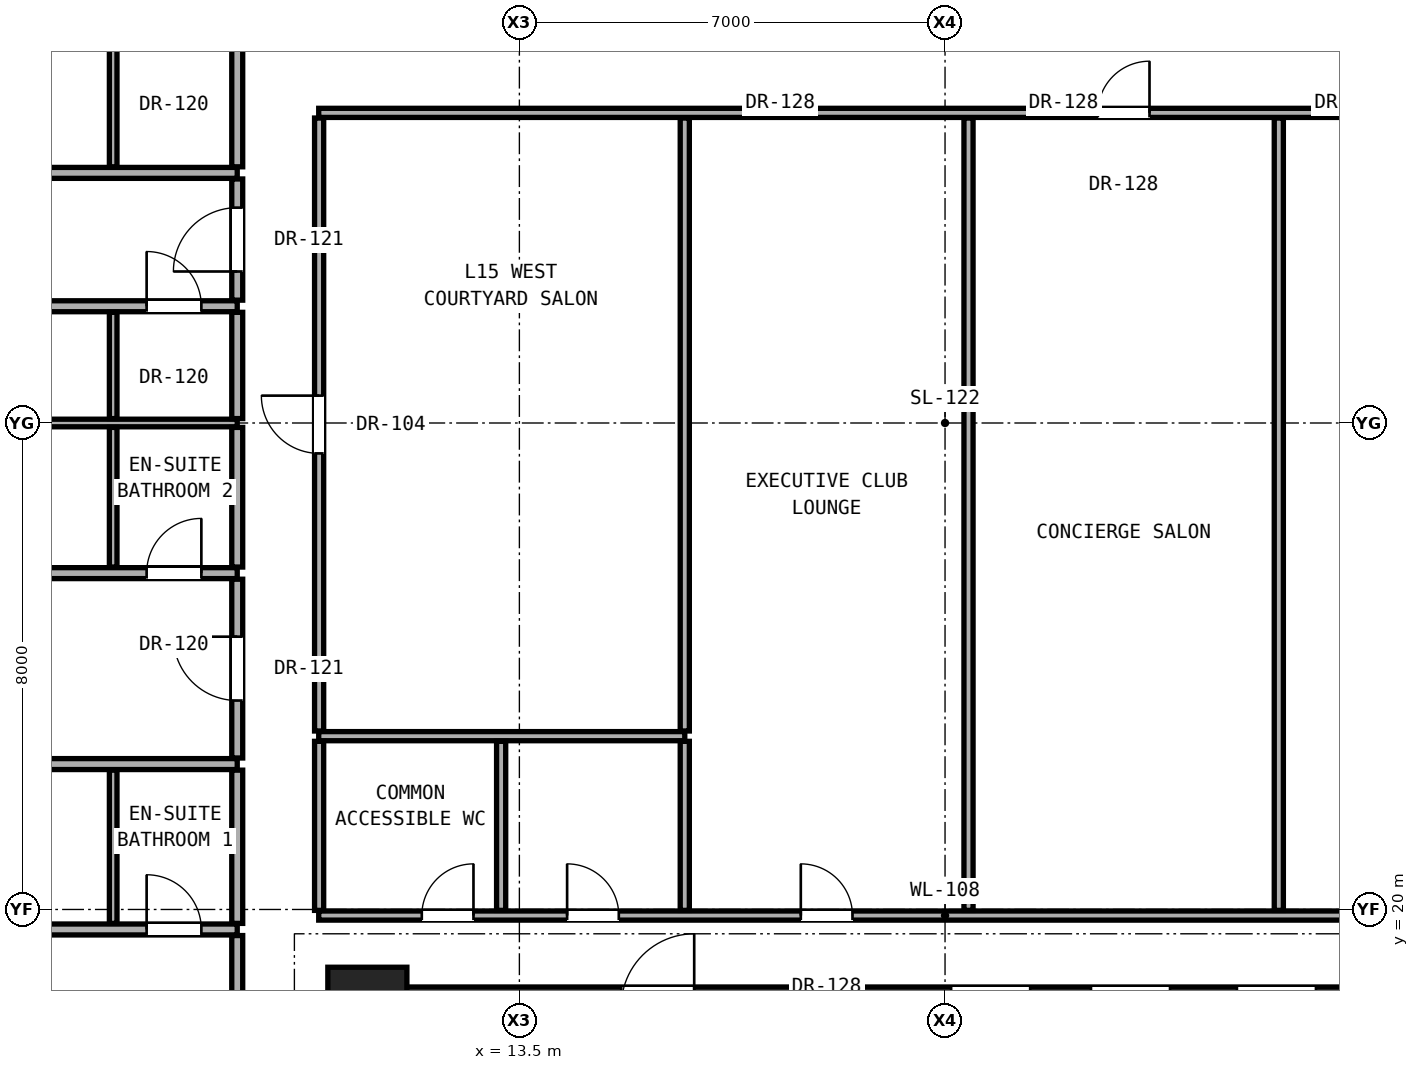
"""IFC4 building model, lengths in metres.
Left out: names, types, materials, properties, quantities, classifications, styles, units other than length and angle.
Written with IfcOpenShell. Run it as: python <this file> out.ifc"""

import sys

from ifc_helpers import new_model, si_unit, direction, frame, frame_2d, origin, origin_2d, place, context, subcontext, project, spatial, rectangle, extrude, element, fill, save


model = new_model("IFC4")
c1 = context("Model", 3, precision=1e-05, world=origin(), true_north=direction((0.0, 1.0)))
c2 = subcontext(c1, "Body", "Model", "MODEL_VIEW")
j1 = project(units=[si_unit("LENGTHUNIT", "METRE"), si_unit("PLANEANGLEUNIT", "RADIAN")], contexts=[c1])
p1 = place(None, origin())
s1 = spatial("IfcSite", under=j1, at=p1, CompositionType="ELEMENT")
p2 = place(p1, origin())
s2 = spatial("IfcBuilding", under=s1, at=p2, CompositionType="ELEMENT")
p3 = place(p2, frame((0.0, 0.0, 55.4)))
s3 = spatial("IfcBuildingStorey", under=s2, at=p3, CompositionType="ELEMENT", Elevation=55.4)
p4 = place(p3, frame((11.0, 18.4, 0.0), z_axis=(0.0, 0.0, 1.0), x_axis=(1.0, 0.0, 0.0)))
e1 = element("IfcColumn", 1, at=p4, inside=s3, PredefinedType="COLUMN", context=c2, shape_type="SweptSolid", body=[
    extrude(rectangle(XDim=1.3, YDim=1.3, at=origin_2d()), origin(), (0.0, 0.0, 1.0), 3.3),
])
p5 = place(p3, frame((11.0, 18.4, 0.0), z_axis=(0.0, 0.0, 1.0), x_axis=(1.0, 0.0, 0.0)))
e2 = element("IfcWall", 2, at=p5, inside=s3, PredefinedType="SHEAR", context=c2, shape_type="SweptSolid", body=[
    extrude(rectangle(XDim=19.0, YDim=0.65, at=frame_2d((9.5, 0.0))), origin(), (0.0, 0.0, 1.0), 3.06),
])
p6 = place(p5, frame((4.175, 0.0, 0.0)))
e3 = element("IfcOpeningElement", 3, at=p6, cuts=e2, PredefinedType="OPENING", context=c2, shape_type="SweptSolid", body=[
    extrude(rectangle(XDim=1.2, YDim=2.25, at=frame_2d((0.6, 1.125))), frame((0.0, 0.335, 0.0), z_axis=(0.0, -1.0, 0.0), x_axis=(1.0, 0.0, 0.0)), (0.0, 0.0, 1.0), 0.67),
])
p7 = place(p5, frame((9.6, 0.0, 0.0)))
e4 = element("IfcOpeningElement", 4, at=p7, cuts=e2, PredefinedType="OPENING", context=c2, shape_type="SweptSolid", body=[
    extrude(rectangle(XDim=1.3, YDim=2.3, at=frame_2d((0.65, 1.15))), frame((0.0, 0.335, 0.0), z_axis=(0.0, -1.0, 0.0), x_axis=(1.0, 0.0, 0.0)), (0.0, 0.0, 1.0), 0.67),
])
p8 = place(p5, frame((11.9, 0.0, 0.0)))
e5 = element("IfcOpeningElement", 5, at=p8, cuts=e2, PredefinedType="OPENING", context=c2, shape_type="SweptSolid", body=[
    extrude(rectangle(XDim=1.3, YDim=2.3, at=frame_2d((0.65, 1.15))), frame((0.0, 0.335, 0.0), z_axis=(0.0, -1.0, 0.0), x_axis=(1.0, 0.0, 0.0)), (0.0, 0.0, 1.0), 0.67),
])
p9 = place(p5, frame((14.3, 0.0, 0.0)))
e6 = element("IfcOpeningElement", 6, at=p9, cuts=e2, PredefinedType="OPENING", context=c2, shape_type="SweptSolid", body=[
    extrude(rectangle(XDim=1.3, YDim=2.3, at=frame_2d((0.65, 1.15))), frame((0.0, 0.335, 0.0), z_axis=(0.0, -1.0, 0.0), x_axis=(1.0, 0.0, 0.0)), (0.0, 0.0, 1.0), 0.67),
])
p10 = place(p5, frame((16.6, 0.0, 0.0)))
e7 = element("IfcOpeningElement", 7, at=p10, cuts=e2, PredefinedType="OPENING", context=c2, shape_type="SweptSolid", body=[
    extrude(rectangle(XDim=1.3, YDim=2.3, at=frame_2d((0.65, 1.15))), frame((0.0, 0.335, 0.0), z_axis=(0.0, -1.0, 0.0), x_axis=(1.0, 0.0, 0.0)), (0.0, 0.0, 1.0), 0.67),
])
p11 = place(p3, frame((-0.36, 19.671, 0.0), z_axis=(0.0, 0.0, 1.0), x_axis=(1.0, 0.0, 0.0)))
e8 = element("IfcWall", 8, at=p11, inside=s3, PredefinedType="PARTITIONING", context=c2, shape_type="SweptSolid", body=[
    extrude(rectangle(XDim=9.22, YDim=0.18, at=frame_2d((4.61, 0.0))), origin(), (0.0, 0.0, 1.0), 2.125),
])
p12 = place(p11, frame((3.485, 0.0, 0.0)))
e9 = element("IfcOpeningElement", 9, at=p12, cuts=e8, PredefinedType="OPENING", context=c2, shape_type="SweptSolid", body=[
    extrude(rectangle(XDim=0.85, YDim=2.01, at=frame_2d((0.425, 1.005))), frame((0.0, 0.1, 0.0), z_axis=(0.0, -1.0, 0.0), x_axis=(1.0, 0.0, 0.0)), (0.0, 0.0, 1.0), 0.2),
])
p13 = place(p11, frame((7.73, 0.0, 0.0)))
e10 = element("IfcOpeningElement", 10, at=p13, cuts=e8, PredefinedType="OPENING", context=c2, shape_type="SweptSolid", body=[
    extrude(rectangle(XDim=0.9, YDim=2.1, at=frame_2d((0.45, 1.05))), frame((0.0, 0.1, 0.0), z_axis=(0.0, -1.0, 0.0), x_axis=(1.0, 0.0, 0.0)), (0.0, 0.0, 1.0), 0.2),
])
p14 = place(p3, frame((10.2, 19.9, 0.0), z_axis=(0.0, 0.0, 1.0), x_axis=(1.0, 0.0, 0.0)))
e11 = element("IfcWall", 11, at=p14, inside=s3, PredefinedType="PARTITIONING", context=c2, shape_type="SweptSolid", body=[
    extrude(rectangle(XDim=20.6, YDim=0.15, at=frame_2d((10.3, 0.0))), origin(), (0.0, 0.0, 1.0), 2.104),
])
p15 = place(p14, frame((1.695, 0.0, 0.0)))
e12 = element("IfcOpeningElement", 12, at=p15, cuts=e11, PredefinedType="OPENING", context=c2, shape_type="SweptSolid", body=[
    extrude(rectangle(XDim=0.85, YDim=2.01, at=frame_2d((0.425, 1.005))), frame((0.0, 0.085, 0.0), z_axis=(0.0, -1.0, 0.0), x_axis=(1.0, 0.0, 0.0)), (0.0, 0.0, 1.0), 0.17),
])
p16 = place(p14, frame((4.085, 0.0, 0.0)))
e13 = element("IfcOpeningElement", 13, at=p16, cuts=e11, PredefinedType="OPENING", context=c2, shape_type="SweptSolid", body=[
    extrude(rectangle(XDim=0.85, YDim=2.01, at=frame_2d((0.425, 1.005))), frame((0.0, 0.085, 0.0), z_axis=(0.0, -1.0, 0.0), x_axis=(1.0, 0.0, 0.0)), (0.0, 0.0, 1.0), 0.17),
])
p17 = place(p14, frame((7.928, 0.0, 0.0)))
e14 = element("IfcOpeningElement", 14, at=p17, cuts=e11, PredefinedType="OPENING", context=c2, shape_type="SweptSolid", body=[
    extrude(rectangle(XDim=0.85, YDim=2.01, at=frame_2d((0.425, 1.005))), frame((0.0, 0.085, 0.0), z_axis=(0.0, -1.0, 0.0), x_axis=(1.0, 0.0, 0.0)), (0.0, 0.0, 1.0), 0.17),
])
p18 = place(p3, frame((-0.36, 22.391, 0.0), z_axis=(0.0, 0.0, 1.0), x_axis=(1.0, 0.0, 0.0)))
e15 = element("IfcWall", 15, at=p18, inside=s3, PredefinedType="PARTITIONING", context=c2, shape_type="SweptSolid", body=[
    extrude(rectangle(XDim=9.22, YDim=0.18, at=frame_2d((4.61, 0.0))), origin(), (0.0, 0.0, 1.0), 2.125),
])
p19 = place(p3, frame((10.2, 22.85, 0.0), z_axis=(0.0, 0.0, 1.0), x_axis=(1.0, 0.0, 0.0)))
e16 = element("IfcWall", 16, at=p19, inside=s3, PredefinedType="PARTITIONING", context=c2, shape_type="SweptSolid", body=[
    extrude(rectangle(XDim=6.02, YDim=0.15, at=frame_2d((3.01, 0.0))), origin(), (0.0, 0.0, 1.0), 2.104),
])
p20 = place(p3, frame((-0.36, 25.531, 0.0), z_axis=(0.0, 0.0, 1.0), x_axis=(1.0, 0.0, 0.0)))
e17 = element("IfcWall", 17, at=p20, inside=s3, PredefinedType="PARTITIONING", context=c2, shape_type="SweptSolid", body=[
    extrude(rectangle(XDim=9.22, YDim=0.18, at=frame_2d((4.61, 0.0))), origin(), (0.0, 0.0, 1.0), 2.125),
])
p21 = place(p20, frame((3.485, 0.0, 0.0)))
e18 = element("IfcOpeningElement", 18, at=p21, cuts=e17, PredefinedType="OPENING", context=c2, shape_type="SweptSolid", body=[
    extrude(rectangle(XDim=0.85, YDim=2.01, at=frame_2d((0.425, 1.005))), frame((0.0, 0.1, 0.0), z_axis=(0.0, -1.0, 0.0), x_axis=(1.0, 0.0, 0.0)), (0.0, 0.0, 1.0), 0.2),
])
p22 = place(p20, frame((7.73, 0.0, 0.0)))
e19 = element("IfcOpeningElement", 19, at=p22, cuts=e17, PredefinedType="OPENING", context=c2, shape_type="SweptSolid", body=[
    extrude(rectangle(XDim=0.9, YDim=2.1, at=frame_2d((0.45, 1.05))), frame((0.0, 0.1, 0.0), z_axis=(0.0, -1.0, 0.0), x_axis=(1.0, 0.0, 0.0)), (0.0, 0.0, 1.0), 0.2),
])
p23 = place(p3, frame((-0.36, 28.0, 0.0), z_axis=(0.0, 0.0, 1.0), x_axis=(1.0, 0.0, 0.0)))
e20 = element("IfcWall", 20, at=p23, inside=s3, PredefinedType="PARTITIONING", context=c2, shape_type="SweptSolid", body=[
    extrude(rectangle(XDim=9.22, YDim=0.125, at=frame_2d((4.61, 0.0))), origin(), (0.0, 0.0, 1.0), 2.125),
])
p24 = place(p3, frame((-0.36, 29.92, 0.0), z_axis=(0.0, 0.0, 1.0), x_axis=(1.0, 0.0, 0.0)))
e21 = element("IfcWall", 21, at=p24, inside=s3, PredefinedType="PARTITIONING", context=c2, shape_type="SweptSolid", body=[
    extrude(rectangle(XDim=9.22, YDim=0.18, at=frame_2d((4.61, 0.0))), origin(), (0.0, 0.0, 1.0), 2.125),
])
p25 = place(p24, frame((3.485, 0.0, 0.0)))
e22 = element("IfcOpeningElement", 22, at=p25, cuts=e21, PredefinedType="OPENING", context=c2, shape_type="SweptSolid", body=[
    extrude(rectangle(XDim=0.85, YDim=2.01, at=frame_2d((0.425, 1.005))), frame((0.0, 0.1, 0.0), z_axis=(0.0, -1.0, 0.0), x_axis=(1.0, 0.0, 0.0)), (0.0, 0.0, 1.0), 0.2),
])
p26 = place(p24, frame((7.73, 0.0, 0.0)))
e23 = element("IfcOpeningElement", 23, at=p26, cuts=e21, PredefinedType="OPENING", context=c2, shape_type="SweptSolid", body=[
    extrude(rectangle(XDim=0.9, YDim=2.1, at=frame_2d((0.45, 1.05))), frame((0.0, 0.1, 0.0), z_axis=(0.0, -1.0, 0.0), x_axis=(1.0, 0.0, 0.0)), (0.0, 0.0, 1.0), 0.2),
])
p27 = place(p3, frame((-0.36, 32.113, 0.0), z_axis=(0.0, 0.0, 1.0), x_axis=(1.0, 0.0, 0.0)))
e24 = element("IfcWall", 24, at=p27, inside=s3, PredefinedType="PARTITIONING", context=c2, shape_type="SweptSolid", body=[
    extrude(rectangle(XDim=9.22, YDim=0.18, at=frame_2d((4.61, 0.0))), origin(), (0.0, 0.0, 1.0), 2.125),
])
p28 = place(p3, frame((10.2, 33.1, 0.0), z_axis=(0.0, 0.0, 1.0), x_axis=(1.0, 0.0, 0.0)))
e25 = element("IfcWall", 25, at=p28, inside=s3, PredefinedType="PARTITIONING", context=c2, shape_type="SweptSolid", body=[
    extrude(rectangle(XDim=20.6, YDim=0.15, at=frame_2d((10.3, 0.0))), origin(), (0.0, 0.0, 1.0), 2.104),
])
p29 = place(p28, frame((12.812, 0.0, 0.0)))
e26 = element("IfcOpeningElement", 26, at=p29, cuts=e25, PredefinedType="OPENING", context=c2, shape_type="SweptSolid", body=[
    extrude(rectangle(XDim=0.85, YDim=2.01, at=frame_2d((0.425, 1.005))), frame((0.0, 0.085, 0.0), z_axis=(0.0, -1.0, 0.0), x_axis=(1.0, 0.0, 0.0)), (0.0, 0.0, 1.0), 0.17),
])
p30 = place(p28, frame((17.75, 0.0, 0.0)))
e27 = element("IfcOpeningElement", 27, at=p30, cuts=e25, PredefinedType="OPENING", context=c2, shape_type="SweptSolid", body=[
    extrude(rectangle(XDim=0.85, YDim=2.01, at=frame_2d((0.425, 1.005))), frame((0.0, 0.085, 0.0), z_axis=(0.0, -1.0, 0.0), x_axis=(1.0, 0.0, 0.0)), (0.0, 0.0, 1.0), 0.17),
])
p31 = place(p3, frame((6.82, 19.771, 0.0), z_axis=(0.0, 0.0, 1.0), x_axis=(0.0, 1.0, 0.0)))
e28 = element("IfcWall", 28, at=p31, inside=s3, PredefinedType="PARTITIONING", context=c2, shape_type="SweptSolid", body=[
    extrude(rectangle(XDim=2.52, YDim=0.125, at=frame_2d((1.26, 0.0))), origin(), (0.0, 0.0, 1.0), 3.06),
])
p32 = place(p3, frame((6.82, 25.631, 0.0), z_axis=(0.0, 0.0, 1.0), x_axis=(0.0, 1.0, 0.0)))
e29 = element("IfcWall", 29, at=p32, inside=s3, PredefinedType="PARTITIONING", context=c2, shape_type="SweptSolid", body=[
    extrude(rectangle(XDim=2.296, YDim=0.125, at=frame_2d((1.148, 0.0))), origin(), (0.0, 0.0, 1.0), 3.06),
])
p33 = place(p3, frame((6.82, 28.073, 0.0), z_axis=(0.0, 0.0, 1.0), x_axis=(0.0, 1.0, 0.0)))
e30 = element("IfcWall", 30, at=p33, inside=s3, PredefinedType="PARTITIONING", context=c2, shape_type="SweptSolid", body=[
    extrude(rectangle(XDim=1.748, YDim=0.125, at=frame_2d((0.874, 0.0))), origin(), (0.0, 0.0, 1.0), 3.06),
])
p34 = place(p3, frame((6.82, 32.213, 0.0), z_axis=(0.0, 0.0, 1.0), x_axis=(0.0, 1.0, 0.0)))
e31 = element("IfcWall", 31, at=p34, inside=s3, PredefinedType="PARTITIONING", context=c2, shape_type="SweptSolid", body=[
    extrude(rectangle(XDim=2.1, YDim=0.125, at=frame_2d((1.05, 0.0))), origin(), (0.0, 0.0, 1.0), 3.06),
])
p35 = place(p3, frame((8.86, 14.602, 0.0), z_axis=(0.0, 0.0, 1.0), x_axis=(0.0, 1.0, 0.0)))
e32 = element("IfcWall", 32, at=p35, inside=s3, PredefinedType="PARTITIONING", context=c2, shape_type="SweptSolid", body=[
    extrude(rectangle(XDim=4.969, YDim=0.18, at=frame_2d((2.484, 0.0))), origin(), (0.0, 0.0, 1.0), 2.436),
])
p36 = place(p35, frame((2.26, 0.0, 0.0)))
e33 = element("IfcOpeningElement", 33, at=p36, cuts=e32, PredefinedType="OPENING", context=c2, shape_type="SweptSolid", body=[
    extrude(rectangle(XDim=1.05, YDim=2.2, at=frame_2d((0.525, 1.1))), frame((0.0, 0.1, 0.0), z_axis=(0.0, -1.0, 0.0), x_axis=(1.0, 0.0, 0.0)), (0.0, 0.0, 1.0), 0.2),
])
p37 = place(p3, frame((8.86, 19.771, 0.0), z_axis=(0.0, 0.0, 1.0), x_axis=(0.0, 1.0, 0.0)))
e34 = element("IfcWall", 34, at=p37, inside=s3, PredefinedType="PARTITIONING", context=c2, shape_type="SweptSolid", body=[
    extrude(rectangle(XDim=2.52, YDim=0.18, at=frame_2d((1.26, 0.0))), origin(), (0.0, 0.0, 1.0), 3.06),
])
p38 = place(p3, frame((8.86, 22.491, 0.0), z_axis=(0.0, 0.0, 1.0), x_axis=(0.0, 1.0, 0.0)))
e35 = element("IfcWall", 35, at=p38, inside=s3, PredefinedType="PARTITIONING", context=c2, shape_type="SweptSolid", body=[
    extrude(rectangle(XDim=2.94, YDim=0.18, at=frame_2d((1.47, 0.0))), origin(), (0.0, 0.0, 1.0), 2.279),
])
p39 = place(p38, frame((0.945, 0.0, 0.0)))
e36 = element("IfcOpeningElement", 36, at=p39, cuts=e35, PredefinedType="OPENING", context=c2, shape_type="SweptSolid", body=[
    extrude(rectangle(XDim=1.05, YDim=2.2, at=frame_2d((0.525, 1.1))), frame((0.0, 0.1, 0.0), z_axis=(0.0, -1.0, 0.0), x_axis=(1.0, 0.0, 0.0)), (0.0, 0.0, 1.0), 0.2),
])
p40 = place(p3, frame((8.86, 25.631, 0.0), z_axis=(0.0, 0.0, 1.0), x_axis=(0.0, 1.0, 0.0)))
e37 = element("IfcWall", 37, at=p40, inside=s3, PredefinedType="PARTITIONING", context=c2, shape_type="SweptSolid", body=[
    extrude(rectangle(XDim=2.296, YDim=0.18, at=frame_2d((1.148, 0.0))), origin(), (0.0, 0.0, 1.0), 3.06),
])
p41 = place(p3, frame((8.86, 28.073, 0.0), z_axis=(0.0, 0.0, 1.0), x_axis=(0.0, 1.0, 0.0)))
e38 = element("IfcWall", 38, at=p41, inside=s3, PredefinedType="PARTITIONING", context=c2, shape_type="SweptSolid", body=[
    extrude(rectangle(XDim=1.748, YDim=0.18, at=frame_2d((0.874, 0.0))), origin(), (0.0, 0.0, 1.0), 3.06),
])
p42 = place(p3, frame((8.86, 30.02, 0.0), z_axis=(0.0, 0.0, 1.0), x_axis=(0.0, 1.0, 0.0)))
e39 = element("IfcWall", 39, at=p42, inside=s3, PredefinedType="PARTITIONING", context=c2, shape_type="SweptSolid", body=[
    extrude(rectangle(XDim=1.993, YDim=0.18, at=frame_2d((0.997, 0.0))), origin(), (0.0, 0.0, 1.0), 2.279),
])
p43 = place(p42, frame((0.471, 0.0, 0.0)))
e40 = element("IfcOpeningElement", 40, at=p43, cuts=e39, PredefinedType="OPENING", context=c2, shape_type="SweptSolid", body=[
    extrude(rectangle(XDim=1.05, YDim=2.2, at=frame_2d((0.525, 1.1))), frame((0.0, 0.1, 0.0), z_axis=(0.0, -1.0, 0.0), x_axis=(1.0, 0.0, 0.0)), (0.0, 0.0, 1.0), 0.2),
])
p44 = place(p3, frame((8.86, 32.213, 0.0), z_axis=(0.0, 0.0, 1.0), x_axis=(0.0, 1.0, 0.0)))
e41 = element("IfcWall", 41, at=p44, inside=s3, PredefinedType="PARTITIONING", context=c2, shape_type="SweptSolid", body=[
    extrude(rectangle(XDim=2.1, YDim=0.18, at=frame_2d((1.05, 0.0))), origin(), (0.0, 0.0, 1.0), 3.06),
])
p45 = place(p3, frame((10.207, 19.985, 0.0), z_axis=(0.0, 0.0, 1.0), x_axis=(0.0, 1.0, 0.0)))
e42 = element("IfcWall", 42, at=p45, inside=s3, PredefinedType="PARTITIONING", context=c2, shape_type="SweptSolid", body=[
    extrude(rectangle(XDim=2.78, YDim=0.15, at=frame_2d((1.39, 0.0))), origin(), (0.0, 0.0, 1.0), 3.06),
])
p46 = place(p3, frame((10.207, 22.935, 0.0), z_axis=(0.0, 0.0, 1.0), x_axis=(0.0, 1.0, 0.0)))
e43 = element("IfcWall", 43, at=p46, inside=s3, PredefinedType="PARTITIONING", context=c2, shape_type="SweptSolid", body=[
    extrude(rectangle(XDim=10.08, YDim=0.15, at=frame_2d((5.04, 0.0))), origin(), (0.0, 0.0, 1.0), 2.279),
])
p47 = place(p46, frame((4.565, 0.0, 0.0)))
e44 = element("IfcOpeningElement", 44, at=p47, cuts=e43, PredefinedType="OPENING", context=c2, shape_type="SweptSolid", body=[
    extrude(rectangle(XDim=0.95, YDim=2.15, at=frame_2d((0.475, 1.075))), frame((0.0, 0.085, 0.0), z_axis=(0.0, -1.0, 0.0), x_axis=(1.0, 0.0, 0.0)), (0.0, 0.0, 1.0), 0.17),
])
for number, where, z_axis, x_axis in (
    (45, (13.2, 19.985, 0.0), (0.0, 0.0, 1.0), (0.0, 1.0, 0.0)),
    (46, (16.22, 19.985, 0.0), (0.0, 0.0, 1.0), (0.0, 1.0, 0.0)),
):
    element("IfcWall", number, at=place(p3, frame(where, z_axis=z_axis, x_axis=x_axis)), inside=s3, PredefinedType="PARTITIONING", context=c2, shape_type="SweptSolid", body=[
        extrude(rectangle(XDim=2.78, YDim=0.15, at=frame_2d((1.39, 0.0))), origin(), (0.0, 0.0, 1.0), 3.06),
    ])
p48 = place(p3, frame((16.22, 22.935, 0.0), z_axis=(0.0, 0.0, 1.0), x_axis=(0.0, 1.0, 0.0)))
e47 = element("IfcWall", 47, at=p48, inside=s3, PredefinedType="PARTITIONING", context=c2, shape_type="SweptSolid", body=[
    extrude(rectangle(XDim=10.08, YDim=0.15, at=frame_2d((5.04, 0.0))), origin(), (0.0, 0.0, 1.0), 2.104),
])
for number, where, z_axis, x_axis in (
    (48, (20.886, 19.985, 0.0), (0.0, 0.0, 1.0), (0.0, 1.0, 0.0)),
    (49, (25.989, 19.985, 0.0), (0.0, 0.0, 1.0), (0.0, 1.0, 0.0)),
):
    element("IfcWall", number, at=place(p3, frame(where, z_axis=z_axis, x_axis=x_axis)), inside=s3, PredefinedType="PARTITIONING", context=c2, shape_type="SweptSolid", body=[
        extrude(rectangle(XDim=13.03, YDim=0.15, at=frame_2d((6.515, 0.0))), origin(), (0.0, 0.0, 1.0), 2.104),
    ])
p49 = place(p15, origin())
e50 = element("IfcDoor", 50, at=p49, inside=s3, OperationType="SINGLE_SWING_RIGHT", PredefinedType="DOOR", context=c2, shape_type="SweptSolid", body=[
    extrude(rectangle(XDim=0.85, YDim=2.01, at=frame_2d((0.425, 1.005))), frame((0.0, 0.025, 0.0), z_axis=(0.0, -1.0, 0.0), x_axis=(1.0, 0.0, 0.0)), (0.0, 0.0, 1.0), 0.05),
])
fill(e12, e50)
p50 = place(p13, origin())
e51 = element("IfcDoor", 51, at=p50, inside=s3, OperationType="SINGLE_SWING_LEFT", PredefinedType="DOOR", context=c2, shape_type="SweptSolid", body=[
    extrude(rectangle(XDim=0.9, YDim=2.1, at=frame_2d((0.45, 1.05))), frame((0.0, 0.025, 0.0), z_axis=(0.0, -1.0, 0.0), x_axis=(1.0, 0.0, 0.0)), (0.0, 0.0, 1.0), 0.05),
])
fill(e10, e51)
p51 = place(p39, origin())
e52 = element("IfcDoor", 52, at=p51, inside=s3, OperationType="SINGLE_SWING_RIGHT", PredefinedType="DOOR", context=c2, shape_type="SweptSolid", body=[
    extrude(rectangle(XDim=1.05, YDim=2.2, at=frame_2d((0.525, 1.1))), frame((0.0, 0.025, 0.0), z_axis=(0.0, -1.0, 0.0), x_axis=(1.0, 0.0, 0.0)), (0.0, 0.0, 1.0), 0.05),
])
fill(e36, e52)
p52 = place(p22, origin())
e53 = element("IfcDoor", 53, at=p52, inside=s3, OperationType="SINGLE_SWING_RIGHT", PredefinedType="DOOR", context=c2, shape_type="SweptSolid", body=[
    extrude(rectangle(XDim=0.9, YDim=2.1, at=frame_2d((0.45, 1.05))), frame((0.0, 0.025, 0.0), z_axis=(0.0, -1.0, 0.0), x_axis=(1.0, 0.0, 0.0)), (0.0, 0.0, 1.0), 0.05),
])
fill(e19, e53)
p53 = place(p43, origin())
e54 = element("IfcDoor", 54, at=p53, inside=s3, OperationType="SINGLE_SWING_LEFT", PredefinedType="DOOR", context=c2, shape_type="SweptSolid", body=[
    extrude(rectangle(XDim=1.05, YDim=2.2, at=frame_2d((0.525, 1.1))), frame((0.0, 0.025, 0.0), z_axis=(0.0, -1.0, 0.0), x_axis=(1.0, 0.0, 0.0)), (0.0, 0.0, 1.0), 0.05),
])
fill(e40, e54)
p54 = place(p26, origin())
e55 = element("IfcDoor", 55, at=p54, inside=s3, OperationType="SINGLE_SWING_LEFT", PredefinedType="DOOR", context=c2, shape_type="SweptSolid", body=[
    extrude(rectangle(XDim=0.9, YDim=2.1, at=frame_2d((0.45, 1.05))), frame((0.0, 0.025, 0.0), z_axis=(0.0, -1.0, 0.0), x_axis=(1.0, 0.0, 0.0)), (0.0, 0.0, 1.0), 0.05),
])
fill(e23, e55)
p55 = place(p16, origin())
e56 = element("IfcDoor", 56, at=p55, inside=s3, OperationType="SINGLE_SWING_LEFT", PredefinedType="DOOR", context=c2, shape_type="SweptSolid", body=[
    extrude(rectangle(XDim=0.85, YDim=2.01, at=frame_2d((0.425, 1.005))), frame((0.0, 0.025, 0.0), z_axis=(0.0, -1.0, 0.0), x_axis=(1.0, 0.0, 0.0)), (0.0, 0.0, 1.0), 0.05),
])
fill(e13, e56)
p56 = place(p47, origin())
e57 = element("IfcDoor", 57, at=p56, inside=s3, OperationType="SINGLE_SWING_RIGHT", PredefinedType="DOOR", context=c2, shape_type="SweptSolid", body=[
    extrude(rectangle(XDim=0.95, YDim=2.15, at=frame_2d((0.475, 1.075))), frame((0.0, 0.025, 0.0), z_axis=(0.0, -1.0, 0.0), x_axis=(1.0, 0.0, 0.0)), (0.0, 0.0, 1.0), 0.05),
])
fill(e44, e57)
p57 = place(p17, origin())
e58 = element("IfcDoor", 58, at=p57, inside=s3, OperationType="SINGLE_SWING_LEFT", PredefinedType="DOOR", context=c2, shape_type="SweptSolid", body=[
    extrude(rectangle(XDim=0.85, YDim=2.01, at=frame_2d((0.425, 1.005))), frame((0.0, 0.025, 0.0), z_axis=(0.0, -1.0, 0.0), x_axis=(1.0, 0.0, 0.0)), (0.0, 0.0, 1.0), 0.05),
])
fill(e14, e58)
p58 = place(p29, origin())
e59 = element("IfcDoor", 59, at=p58, inside=s3, OperationType="SINGLE_SWING_RIGHT", PredefinedType="DOOR", context=c2, shape_type="SweptSolid", body=[
    extrude(rectangle(XDim=0.85, YDim=2.01, at=frame_2d((0.425, 1.005))), frame((0.0, 0.025, 0.0), z_axis=(0.0, -1.0, 0.0), x_axis=(1.0, 0.0, 0.0)), (0.0, 0.0, 1.0), 0.05),
])
fill(e26, e59)
save(model, sys.argv[1])
